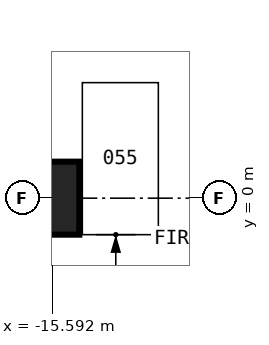
"""IFC4 building model, lengths in metres.
Left out: names, types, materials, properties, quantities, classifications, styles, units other than length and angle.
Written with IfcOpenShell. Run it as: python <this file> out.ifc"""

import sys

from ifc_helpers import new_model, si_unit, direction, frame, origin, origin_2d, place, context, subcontext, project, spatial, rectangle, extrude, element, save


model = new_model("IFC4")
c1 = context("Model", 3, precision=1e-05, world=origin(), true_north=direction((0.0, 1.0)))
c2 = subcontext(c1, "Body", "Model", "MODEL_VIEW")
j1 = project(units=[si_unit("LENGTHUNIT", "METRE"), si_unit("PLANEANGLEUNIT", "RADIAN")], contexts=[c1])
p1 = place(None, origin())
s1 = spatial("IfcSite", under=j1, at=p1, CompositionType="ELEMENT")
p2 = place(p1, origin())
s2 = spatial("IfcBuilding", under=s1, at=p2, CompositionType="ELEMENT")
p3 = place(p2, frame((0.0, 0.0, -13.5)))
s3 = spatial("IfcBuildingStorey", under=s2, at=p3, CompositionType="ELEMENT", Elevation=-13.5)
p4 = place(p3, frame((-15.9, 0.0, 0.0), z_axis=(0.0, 0.0, 1.0), x_axis=(1.0, 0.0, 0.0)))
e1 = element("IfcColumn", 1, at=p4, inside=s3, PredefinedType="COLUMN", context=c2, shape_type="SweptSolid", body=[
    extrude(rectangle(XDim=2.4, YDim=2.4, at=origin_2d()), origin(), (0.0, 0.0, 1.0), 4.5),
])
save(model, sys.argv[1])
